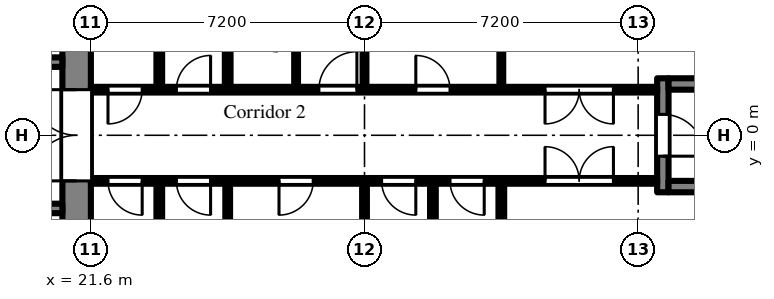
"""IFC4 building model, lengths in metres.
Left out: names, types, materials, properties, quantities, classifications, styles, units other than length and angle.
Written with IfcOpenShell. Run it as: python <this file> out.ifc"""

import sys

from ifc_helpers import new_model, si_unit, direction, frame, frame_2d, origin, place, context, subcontext, project, spatial, rectangle, extrude, element, fill, save


model = new_model("IFC4")
c1 = context("Model", 3, precision=1e-05, world=origin(), true_north=direction((0.0, 1.0)))
c2 = subcontext(c1, "Body", "Model", "MODEL_VIEW")
j1 = project(units=[si_unit("LENGTHUNIT", "METRE"), si_unit("PLANEANGLEUNIT", "RADIAN")], contexts=[c1])
p1 = place(None, origin())
s1 = spatial("IfcSite", under=j1, at=p1, CompositionType="ELEMENT")
p2 = place(p1, origin())
s2 = spatial("IfcBuilding", under=s1, at=p2, CompositionType="ELEMENT")
p3 = place(p2, frame((0.0, 0.0, 75.9)))
s3 = spatial("IfcBuildingStorey", under=s2, at=p3, CompositionType="ELEMENT", Elevation=75.9)
p4 = place(p3, frame((21.225, -7.2, 0.0), z_axis=(0.0, 0.0, 1.0), x_axis=(0.0, 1.0, 0.0)))
e1 = element("IfcWall", 1, at=p4, inside=s3, PredefinedType="SHEAR", context=c2, shape_type="SweptSolid", body=[
    extrude(rectangle(XDim=14.4, YDim=0.75, at=frame_2d((7.2, 0.0))), origin(), (0.0, 0.0, 1.0), 2.575),
])
p5 = place(p4, frame((6.0, 0.0, 0.0)))
e2 = element("IfcOpeningElement", 2, at=p5, cuts=e1, PredefinedType="OPENING", context=c2, shape_type="SweptSolid", body=[
    extrude(rectangle(XDim=2.4, YDim=2.2, at=frame_2d((1.2, 1.1))), frame((0.0, 0.385, 0.0), z_axis=(0.0, -1.0, 0.0), x_axis=(1.0, 0.0, 0.0)), (0.0, 0.0, 1.0), 0.77),
])
p6 = place(p3, frame((7.9, 1.925, 0.0), z_axis=(0.0, 0.0, 1.0), x_axis=(1.0, 0.0, 0.0)))
e3 = element("IfcWall", 3, at=p6, inside=s3, PredefinedType="SHEAR", context=c2, shape_type="SweptSolid", body=[
    extrude(rectangle(XDim=12.95, YDim=0.25, at=frame_2d((6.475, 0.0))), origin(), (0.0, 0.0, 1.0), 2.575),
])
p7 = place(p6, frame((0.525, 0.0, 0.0)))
e4 = element("IfcOpeningElement", 4, at=p7, cuts=e3, PredefinedType="OPENING", context=c2, shape_type="SweptSolid", body=[
    extrude(rectangle(XDim=0.9, YDim=2.1, at=frame_2d((0.45, 1.05))), frame((0.0, 0.135, 0.0), z_axis=(0.0, -1.0, 0.0), x_axis=(1.0, 0.0, 0.0)), (0.0, 0.0, 1.0), 0.27),
])
p8 = place(p6, frame((2.625, 0.0, 0.0)))
e5 = element("IfcOpeningElement", 5, at=p8, cuts=e3, PredefinedType="OPENING", context=c2, shape_type="SweptSolid", body=[
    extrude(rectangle(XDim=1.1, YDim=2.1, at=frame_2d((0.55, 1.05))), frame((0.0, 0.135, 0.0), z_axis=(0.0, -1.0, 0.0), x_axis=(1.0, 0.0, 0.0)), (0.0, 0.0, 1.0), 0.27),
])
p9 = place(p6, frame((4.925, 0.0, 0.0)))
e6 = element("IfcOpeningElement", 6, at=p9, cuts=e3, PredefinedType="OPENING", context=c2, shape_type="SweptSolid", body=[
    extrude(rectangle(XDim=0.9, YDim=2.1, at=frame_2d((0.45, 1.05))), frame((0.0, 0.135, 0.0), z_axis=(0.0, -1.0, 0.0), x_axis=(1.0, 0.0, 0.0)), (0.0, 0.0, 1.0), 0.27),
])
p10 = place(p6, frame((8.225, 0.0, 0.0)))
e7 = element("IfcOpeningElement", 7, at=p10, cuts=e3, PredefinedType="OPENING", context=c2, shape_type="SweptSolid", body=[
    extrude(rectangle(XDim=0.9, YDim=2.1, at=frame_2d((0.45, 1.05))), frame((0.0, 0.135, 0.0), z_axis=(0.0, -1.0, 0.0), x_axis=(1.0, 0.0, 0.0)), (0.0, 0.0, 1.0), 0.27),
])
p11 = place(p3, frame((7.9, -1.925, 0.0), z_axis=(0.0, 0.0, 1.0), x_axis=(1.0, 0.0, 0.0)))
e8 = element("IfcWall", 8, at=p11, inside=s3, PredefinedType="SHEAR", context=c2, shape_type="SweptSolid", body=[
    extrude(rectangle(XDim=12.95, YDim=0.25, at=frame_2d((6.475, 0.0))), origin(), (0.0, 0.0, 1.0), 2.575),
])
p12 = place(p11, frame((4.825, 0.0, 0.0)))
e9 = element("IfcOpeningElement", 9, at=p12, cuts=e8, PredefinedType="OPENING", context=c2, shape_type="SweptSolid", body=[
    extrude(rectangle(XDim=1.1, YDim=2.1, at=frame_2d((0.55, 1.05))), frame((0.0, 0.135, 0.0), z_axis=(0.0, -1.0, 0.0), x_axis=(1.0, 0.0, 0.0)), (0.0, 0.0, 1.0), 0.27),
])
p13 = place(p11, frame((7.025, 0.0, 0.0)))
e10 = element("IfcOpeningElement", 10, at=p13, cuts=e8, PredefinedType="OPENING", context=c2, shape_type="SweptSolid", body=[
    extrude(rectangle(XDim=1.1, YDim=2.1, at=frame_2d((0.55, 1.05))), frame((0.0, 0.135, 0.0), z_axis=(0.0, -1.0, 0.0), x_axis=(1.0, 0.0, 0.0)), (0.0, 0.0, 1.0), 0.27),
])
p14 = place(p11, frame((9.225, 0.0, 0.0)))
e11 = element("IfcOpeningElement", 11, at=p14, cuts=e8, PredefinedType="OPENING", context=c2, shape_type="SweptSolid", body=[
    extrude(rectangle(XDim=1.1, YDim=2.1, at=frame_2d((0.55, 1.05))), frame((0.0, 0.135, 0.0), z_axis=(0.0, -1.0, 0.0), x_axis=(1.0, 0.0, 0.0)), (0.0, 0.0, 1.0), 0.27),
])
p15 = place(p11, frame((0.525, 0.0, 0.0)))
e12 = element("IfcOpeningElement", 12, at=p15, cuts=e8, PredefinedType="OPENING", context=c2, shape_type="SweptSolid", body=[
    extrude(rectangle(XDim=0.9, YDim=2.1, at=frame_2d((0.45, 1.05))), frame((0.0, 0.135, 0.0), z_axis=(0.0, -1.0, 0.0), x_axis=(1.0, 0.0, 0.0)), (0.0, 0.0, 1.0), 0.27),
])
p16 = place(p11, frame((2.625, 0.0, 0.0)))
e13 = element("IfcOpeningElement", 13, at=p16, cuts=e8, PredefinedType="OPENING", context=c2, shape_type="SweptSolid", body=[
    extrude(rectangle(XDim=1.1, YDim=2.1, at=frame_2d((0.55, 1.05))), frame((0.0, 0.135, 0.0), z_axis=(0.0, -1.0, 0.0), x_axis=(1.0, 0.0, 0.0)), (0.0, 0.0, 1.0), 0.27),
])
p17 = place(p3, frame((36.65, -1.5, 0.0), z_axis=(0.0, 0.0, 1.0), x_axis=(0.0, 1.0, 0.0)))
e14 = element("IfcWall", 14, at=p17, inside=s3, PredefinedType="SHEAR", context=c2, shape_type="SweptSolid", body=[
    extrude(rectangle(XDim=3.0, YDim=0.3, at=frame_2d((1.5, 0.0))), origin(), (0.0, 0.0, 1.0), 2.575),
])
p18 = place(p17, frame((0.95, 0.0, 0.0)))
e15 = element("IfcOpeningElement", 15, at=p18, cuts=e14, PredefinedType="OPENING", context=c2, shape_type="SweptSolid", body=[
    extrude(rectangle(XDim=1.1, YDim=2.1, at=frame_2d((0.55, 1.05))), frame((0.0, 0.16, 0.0), z_axis=(0.0, -1.0, 0.0), x_axis=(1.0, 0.0, 0.0)), (0.0, 0.0, 1.0), 0.32),
])
for number, where, z_axis, x_axis in (
    (16, (36.8, -1.35, 0.0), (0.0, 0.0, 1.0), (1.0, 0.0, 0.0)),
    (17, (36.8, 1.35, 0.0), (0.0, 0.0, 1.0), (1.0, 0.0, 0.0)),
):
    element("IfcWall", number, at=place(p3, frame(where, z_axis=z_axis, x_axis=x_axis)), inside=s3, PredefinedType="SHEAR", context=c2, shape_type="SweptSolid", body=[
        extrude(rectangle(XDim=5.8, YDim=0.3, at=frame_2d((2.9, 0.0))), origin(), (0.0, 0.0, 1.0), 2.575),
    ])
p19 = place(p3, frame((21.6, -1.2, 0.0), z_axis=(0.0, 0.0, 1.0), x_axis=(1.0, 0.0, 0.0)))
e18 = element("IfcWall", 18, at=p19, inside=s3, PredefinedType="PARTITIONING", context=c2, shape_type="SweptSolid", body=[
    extrude(rectangle(XDim=14.9, YDim=0.15, at=frame_2d((7.45, 0.0))), origin(), (0.0, 0.0, 1.0), 2.575),
])
p20 = place(p19, frame((0.45, 0.0, 0.0)))
e19 = element("IfcOpeningElement", 19, at=p20, cuts=e18, PredefinedType="OPENING", context=c2, shape_type="SweptSolid", body=[
    extrude(rectangle(XDim=0.9, YDim=2.1, at=frame_2d((0.45, 1.05))), frame((0.0, 0.085, 0.0), z_axis=(0.0, -1.0, 0.0), x_axis=(1.0, 0.0, 0.0)), (0.0, 0.0, 1.0), 0.17),
])
p21 = place(p19, frame((2.25, 0.0, 0.0)))
e20 = element("IfcOpeningElement", 20, at=p21, cuts=e18, PredefinedType="OPENING", context=c2, shape_type="SweptSolid", body=[
    extrude(rectangle(XDim=0.9, YDim=2.1, at=frame_2d((0.45, 1.05))), frame((0.0, 0.085, 0.0), z_axis=(0.0, -1.0, 0.0), x_axis=(1.0, 0.0, 0.0)), (0.0, 0.0, 1.0), 0.17),
])
p22 = place(p19, frame((4.95, 0.0, 0.0)))
e21 = element("IfcOpeningElement", 21, at=p22, cuts=e18, PredefinedType="OPENING", context=c2, shape_type="SweptSolid", body=[
    extrude(rectangle(XDim=0.9, YDim=2.1, at=frame_2d((0.45, 1.05))), frame((0.0, 0.085, 0.0), z_axis=(0.0, -1.0, 0.0), x_axis=(1.0, 0.0, 0.0)), (0.0, 0.0, 1.0), 0.17),
])
p23 = place(p19, frame((7.65, 0.0, 0.0)))
e22 = element("IfcOpeningElement", 22, at=p23, cuts=e18, PredefinedType="OPENING", context=c2, shape_type="SweptSolid", body=[
    extrude(rectangle(XDim=0.9, YDim=2.1, at=frame_2d((0.45, 1.05))), frame((0.0, 0.085, 0.0), z_axis=(0.0, -1.0, 0.0), x_axis=(1.0, 0.0, 0.0)), (0.0, 0.0, 1.0), 0.17),
])
p24 = place(p19, frame((9.45, 0.0, 0.0)))
e23 = element("IfcOpeningElement", 23, at=p24, cuts=e18, PredefinedType="OPENING", context=c2, shape_type="SweptSolid", body=[
    extrude(rectangle(XDim=0.9, YDim=2.1, at=frame_2d((0.45, 1.05))), frame((0.0, 0.085, 0.0), z_axis=(0.0, -1.0, 0.0), x_axis=(1.0, 0.0, 0.0)), (0.0, 0.0, 1.0), 0.17),
])
p25 = place(p19, frame((11.95, 0.0, 0.0)))
e24 = element("IfcOpeningElement", 24, at=p25, cuts=e18, PredefinedType="OPENING", context=c2, shape_type="SweptSolid", body=[
    extrude(rectangle(XDim=1.8, YDim=2.1, at=frame_2d((0.9, 1.05))), frame((0.0, 0.085, 0.0), z_axis=(0.0, -1.0, 0.0), x_axis=(1.0, 0.0, 0.0)), (0.0, 0.0, 1.0), 0.17),
])
p26 = place(p3, frame((21.6, 1.2, 0.0), z_axis=(0.0, 0.0, 1.0), x_axis=(1.0, 0.0, 0.0)))
e25 = element("IfcWall", 25, at=p26, inside=s3, PredefinedType="PARTITIONING", context=c2, shape_type="SweptSolid", body=[
    extrude(rectangle(XDim=14.9, YDim=0.15, at=frame_2d((7.45, 0.0))), origin(), (0.0, 0.0, 1.0), 2.575),
])
p27 = place(p26, frame((0.45, 0.0, 0.0)))
e26 = element("IfcOpeningElement", 26, at=p27, cuts=e25, PredefinedType="OPENING", context=c2, shape_type="SweptSolid", body=[
    extrude(rectangle(XDim=0.9, YDim=2.1, at=frame_2d((0.45, 1.05))), frame((0.0, 0.085, 0.0), z_axis=(0.0, -1.0, 0.0), x_axis=(1.0, 0.0, 0.0)), (0.0, 0.0, 1.0), 0.17),
])
p28 = place(p26, frame((2.25, 0.0, 0.0)))
e27 = element("IfcOpeningElement", 27, at=p28, cuts=e25, PredefinedType="OPENING", context=c2, shape_type="SweptSolid", body=[
    extrude(rectangle(XDim=0.9, YDim=2.1, at=frame_2d((0.45, 1.05))), frame((0.0, 0.085, 0.0), z_axis=(0.0, -1.0, 0.0), x_axis=(1.0, 0.0, 0.0)), (0.0, 0.0, 1.0), 0.17),
])
p29 = place(p26, frame((6.0, 0.0, 0.0)))
e28 = element("IfcOpeningElement", 28, at=p29, cuts=e25, PredefinedType="OPENING", context=c2, shape_type="SweptSolid", body=[
    extrude(rectangle(XDim=1.0, YDim=2.1, at=frame_2d((0.5, 1.05))), frame((0.0, 0.085, 0.0), z_axis=(0.0, -1.0, 0.0), x_axis=(1.0, 0.0, 0.0)), (0.0, 0.0, 1.0), 0.17),
])
p30 = place(p26, frame((8.55, 0.0, 0.0)))
e29 = element("IfcOpeningElement", 29, at=p30, cuts=e25, PredefinedType="OPENING", context=c2, shape_type="SweptSolid", body=[
    extrude(rectangle(XDim=0.9, YDim=2.1, at=frame_2d((0.45, 1.05))), frame((0.0, 0.085, 0.0), z_axis=(0.0, -1.0, 0.0), x_axis=(1.0, 0.0, 0.0)), (0.0, 0.0, 1.0), 0.17),
])
p31 = place(p26, frame((11.95, 0.0, 0.0)))
e30 = element("IfcOpeningElement", 30, at=p31, cuts=e25, PredefinedType="OPENING", context=c2, shape_type="SweptSolid", body=[
    extrude(rectangle(XDim=1.8, YDim=2.1, at=frame_2d((0.9, 1.05))), frame((0.0, 0.085, 0.0), z_axis=(0.0, -1.0, 0.0), x_axis=(1.0, 0.0, 0.0)), (0.0, 0.0, 1.0), 0.17),
])
for number, where, z_axis, x_axis in (
    (31, (23.4, -6.9, 0.0), (0.0, 0.0, 1.0), (0.0, 1.0, 0.0)),
    (32, (23.4, 1.275, 0.0), (0.0, 0.0, 1.0), (0.0, 1.0, 0.0)),
):
    element("IfcWall", number, at=place(p3, frame(where, z_axis=z_axis, x_axis=x_axis)), inside=s3, PredefinedType="PARTITIONING", context=c2, shape_type="SweptSolid", body=[
        extrude(rectangle(XDim=5.625, YDim=0.15, at=frame_2d((2.812, 0.0))), origin(), (0.0, 0.0, 1.0), 2.575),
    ])
p32 = place(p3, frame((25.2, -6.9, 0.0), z_axis=(0.0, 0.0, 1.0), x_axis=(0.0, 1.0, 0.0)))
e33 = element("IfcWall", 33, at=p32, inside=s3, PredefinedType="PARTITIONING", context=c2, shape_type="SweptSolid", body=[
    extrude(rectangle(XDim=5.625, YDim=0.125, at=frame_2d((2.812, 0.0))), origin(), (0.0, 0.0, 1.0), 2.575),
])
p33 = place(p3, frame((25.2, 1.275, 0.0), z_axis=(0.0, 0.0, 1.0), x_axis=(0.0, 1.0, 0.0)))
e34 = element("IfcWall", 34, at=p33, inside=s3, PredefinedType="PARTITIONING", context=c2, shape_type="SweptSolid", body=[
    extrude(rectangle(XDim=5.625, YDim=0.15, at=frame_2d((2.812, 0.0))), origin(), (0.0, 0.0, 1.0), 2.575),
])
p34 = place(p3, frame((27.0, 1.275, 0.0), z_axis=(0.0, 0.0, 1.0), x_axis=(0.0, 1.0, 0.0)))
e35 = element("IfcWall", 35, at=p34, inside=s3, PredefinedType="PARTITIONING", context=c2, shape_type="SweptSolid", body=[
    extrude(rectangle(XDim=1.675, YDim=0.1, at=frame_2d((0.837, 0.0))), origin(), (0.0, 0.0, 1.0), 2.575),
])
p35 = place(p3, frame((28.8, -6.9, 0.0), z_axis=(0.0, 0.0, 1.0), x_axis=(0.0, 1.0, 0.0)))
e36 = element("IfcWall", 36, at=p35, inside=s3, PredefinedType="PARTITIONING", context=c2, shape_type="SweptSolid", body=[
    extrude(rectangle(XDim=5.625, YDim=0.125, at=frame_2d((2.812, 0.0))), origin(), (0.0, 0.0, 1.0), 2.575),
])
p36 = place(p3, frame((28.8, 1.275, 0.0), z_axis=(0.0, 0.0, 1.0), x_axis=(0.0, 1.0, 0.0)))
e37 = element("IfcWall", 37, at=p36, inside=s3, PredefinedType="PARTITIONING", context=c2, shape_type="SweptSolid", body=[
    extrude(rectangle(XDim=5.625, YDim=0.1, at=frame_2d((2.812, 0.0))), origin(), (0.0, 0.0, 1.0), 2.575),
])
for number, where, z_axis, x_axis in (
    (38, (30.6, -6.9, 0.0), (0.0, 0.0, 1.0), (0.0, 1.0, 0.0)),
    (39, (32.4, -6.9, 0.0), (0.0, 0.0, 1.0), (0.0, 1.0, 0.0)),
):
    element("IfcWall", number, at=place(p3, frame(where, z_axis=z_axis, x_axis=x_axis)), inside=s3, PredefinedType="PARTITIONING", context=c2, shape_type="SweptSolid", body=[
        extrude(rectangle(XDim=5.625, YDim=0.15, at=frame_2d((2.812, 0.0))), origin(), (0.0, 0.0, 1.0), 2.575),
    ])
p37 = place(p3, frame((32.4, 1.275, 0.0), z_axis=(0.0, 0.0, 1.0), x_axis=(0.0, 1.0, 0.0)))
e40 = element("IfcWall", 40, at=p37, inside=s3, PredefinedType="PARTITIONING", context=c2, shape_type="SweptSolid", body=[
    extrude(rectangle(XDim=5.625, YDim=0.1, at=frame_2d((2.812, 0.0))), origin(), (0.0, 0.0, 1.0), 2.575),
])
p38 = place(p5, origin())
e41 = element("IfcDoor", 41, at=p38, inside=s3, OperationType="DOUBLE_DOOR_DOUBLE_SWING", PredefinedType="DOOR", context=c2, shape_type="SweptSolid", body=[
    extrude(rectangle(XDim=2.4, YDim=2.2, at=frame_2d((1.2, 1.1))), frame((0.0, 0.025, 0.0), z_axis=(0.0, -1.0, 0.0), x_axis=(1.0, 0.0, 0.0)), (0.0, 0.0, 1.0), 0.05),
])
fill(e2, e41)
p39 = place(p18, frame((1.1, 0.0, 0.0), z_axis=(0.0, 0.0, 1.0), x_axis=(-1.0, 0.0, 0.0)))
e42 = element("IfcDoor", 42, at=p39, inside=s3, OperationType="SINGLE_SWING_RIGHT", PredefinedType="DOOR", context=c2, shape_type="SweptSolid", body=[
    extrude(rectangle(XDim=1.1, YDim=2.1, at=frame_2d((0.55, 1.05))), frame((0.0, 0.025, 0.0), z_axis=(0.0, -1.0, 0.0), x_axis=(1.0, 0.0, 0.0)), (0.0, 0.0, 1.0), 0.05),
])
fill(e15, e42)
p40 = place(p27, frame((0.9, 0.0, 0.0), z_axis=(0.0, 0.0, 1.0), x_axis=(-1.0, 0.0, 0.0)))
e43 = element("IfcDoor", 43, at=p40, inside=s3, OperationType="SINGLE_SWING_RIGHT", PredefinedType="DOOR", context=c2, shape_type="SweptSolid", body=[
    extrude(rectangle(XDim=0.9, YDim=2.1, at=frame_2d((0.45, 1.05))), frame((0.0, 0.025, 0.0), z_axis=(0.0, -1.0, 0.0), x_axis=(1.0, 0.0, 0.0)), (0.0, 0.0, 1.0), 0.05),
])
fill(e26, e43)
p41 = place(p28, origin())
e44 = element("IfcDoor", 44, at=p41, inside=s3, OperationType="SINGLE_SWING_RIGHT", PredefinedType="DOOR", context=c2, shape_type="SweptSolid", body=[
    extrude(rectangle(XDim=0.9, YDim=2.1, at=frame_2d((0.45, 1.05))), frame((0.0, 0.025, 0.0), z_axis=(0.0, -1.0, 0.0), x_axis=(1.0, 0.0, 0.0)), (0.0, 0.0, 1.0), 0.05),
])
fill(e27, e44)
p42 = place(p29, origin())
e45 = element("IfcDoor", 45, at=p42, inside=s3, OperationType="SINGLE_SWING_RIGHT", PredefinedType="DOOR", context=c2, shape_type="SweptSolid", body=[
    extrude(rectangle(XDim=1.0, YDim=2.1, at=frame_2d((0.5, 1.05))), frame((0.0, 0.025, 0.0), z_axis=(0.0, -1.0, 0.0), x_axis=(1.0, 0.0, 0.0)), (0.0, 0.0, 1.0), 0.05),
])
fill(e28, e45)
p43 = place(p30, origin())
e46 = element("IfcDoor", 46, at=p43, inside=s3, OperationType="SINGLE_SWING_LEFT", PredefinedType="DOOR", context=c2, shape_type="SweptSolid", body=[
    extrude(rectangle(XDim=0.9, YDim=2.1, at=frame_2d((0.45, 1.05))), frame((0.0, 0.025, 0.0), z_axis=(0.0, -1.0, 0.0), x_axis=(1.0, 0.0, 0.0)), (0.0, 0.0, 1.0), 0.05),
])
fill(e29, e46)
p44 = place(p31, frame((1.8, 0.0, 0.0), z_axis=(0.0, 0.0, 1.0), x_axis=(-1.0, 0.0, 0.0)))
e47 = element("IfcDoor", 47, at=p44, inside=s3, OperationType="DOUBLE_DOOR_DOUBLE_SWING", PredefinedType="DOOR", context=c2, shape_type="SweptSolid", body=[
    extrude(rectangle(XDim=1.8, YDim=2.1, at=frame_2d((0.9, 1.05))), frame((0.0, 0.025, 0.0), z_axis=(0.0, -1.0, 0.0), x_axis=(1.0, 0.0, 0.0)), (0.0, 0.0, 1.0), 0.05),
])
fill(e30, e47)
p45 = place(p20, frame((0.9, 0.0, 0.0), z_axis=(0.0, 0.0, 1.0), x_axis=(-1.0, 0.0, 0.0)))
e48 = element("IfcDoor", 48, at=p45, inside=s3, OperationType="SINGLE_SWING_LEFT", PredefinedType="DOOR", context=c2, shape_type="SweptSolid", body=[
    extrude(rectangle(XDim=0.9, YDim=2.1, at=frame_2d((0.45, 1.05))), frame((0.0, 0.025, 0.0), z_axis=(0.0, -1.0, 0.0), x_axis=(1.0, 0.0, 0.0)), (0.0, 0.0, 1.0), 0.05),
])
fill(e19, e48)
p46 = place(p21, frame((0.9, 0.0, 0.0), z_axis=(0.0, 0.0, 1.0), x_axis=(-1.0, 0.0, 0.0)))
e49 = element("IfcDoor", 49, at=p46, inside=s3, OperationType="SINGLE_SWING_LEFT", PredefinedType="DOOR", context=c2, shape_type="SweptSolid", body=[
    extrude(rectangle(XDim=0.9, YDim=2.1, at=frame_2d((0.45, 1.05))), frame((0.0, 0.025, 0.0), z_axis=(0.0, -1.0, 0.0), x_axis=(1.0, 0.0, 0.0)), (0.0, 0.0, 1.0), 0.05),
])
fill(e20, e49)
p47 = place(p22, frame((0.9, 0.0, 0.0), z_axis=(0.0, 0.0, 1.0), x_axis=(-1.0, 0.0, 0.0)))
e50 = element("IfcDoor", 50, at=p47, inside=s3, OperationType="SINGLE_SWING_RIGHT", PredefinedType="DOOR", context=c2, shape_type="SweptSolid", body=[
    extrude(rectangle(XDim=0.9, YDim=2.1, at=frame_2d((0.45, 1.05))), frame((0.0, 0.025, 0.0), z_axis=(0.0, -1.0, 0.0), x_axis=(1.0, 0.0, 0.0)), (0.0, 0.0, 1.0), 0.05),
])
fill(e21, e50)
p48 = place(p23, frame((0.9, 0.0, 0.0), z_axis=(0.0, 0.0, 1.0), x_axis=(-1.0, 0.0, 0.0)))
e51 = element("IfcDoor", 51, at=p48, inside=s3, OperationType="SINGLE_SWING_LEFT", PredefinedType="DOOR", context=c2, shape_type="SweptSolid", body=[
    extrude(rectangle(XDim=0.9, YDim=2.1, at=frame_2d((0.45, 1.05))), frame((0.0, 0.025, 0.0), z_axis=(0.0, -1.0, 0.0), x_axis=(1.0, 0.0, 0.0)), (0.0, 0.0, 1.0), 0.05),
])
fill(e22, e51)
p49 = place(p24, frame((0.9, 0.0, 0.0), z_axis=(0.0, 0.0, 1.0), x_axis=(-1.0, 0.0, 0.0)))
e52 = element("IfcDoor", 52, at=p49, inside=s3, OperationType="SINGLE_SWING_LEFT", PredefinedType="DOOR", context=c2, shape_type="SweptSolid", body=[
    extrude(rectangle(XDim=0.9, YDim=2.1, at=frame_2d((0.45, 1.05))), frame((0.0, 0.025, 0.0), z_axis=(0.0, -1.0, 0.0), x_axis=(1.0, 0.0, 0.0)), (0.0, 0.0, 1.0), 0.05),
])
fill(e23, e52)
p50 = place(p25, origin())
e53 = element("IfcDoor", 53, at=p50, inside=s3, OperationType="DOUBLE_DOOR_DOUBLE_SWING", PredefinedType="DOOR", context=c2, shape_type="SweptSolid", body=[
    extrude(rectangle(XDim=1.8, YDim=2.1, at=frame_2d((0.9, 1.05))), frame((0.0, 0.025, 0.0), z_axis=(0.0, -1.0, 0.0), x_axis=(1.0, 0.0, 0.0)), (0.0, 0.0, 1.0), 0.05),
])
fill(e24, e53)
save(model, sys.argv[1])
